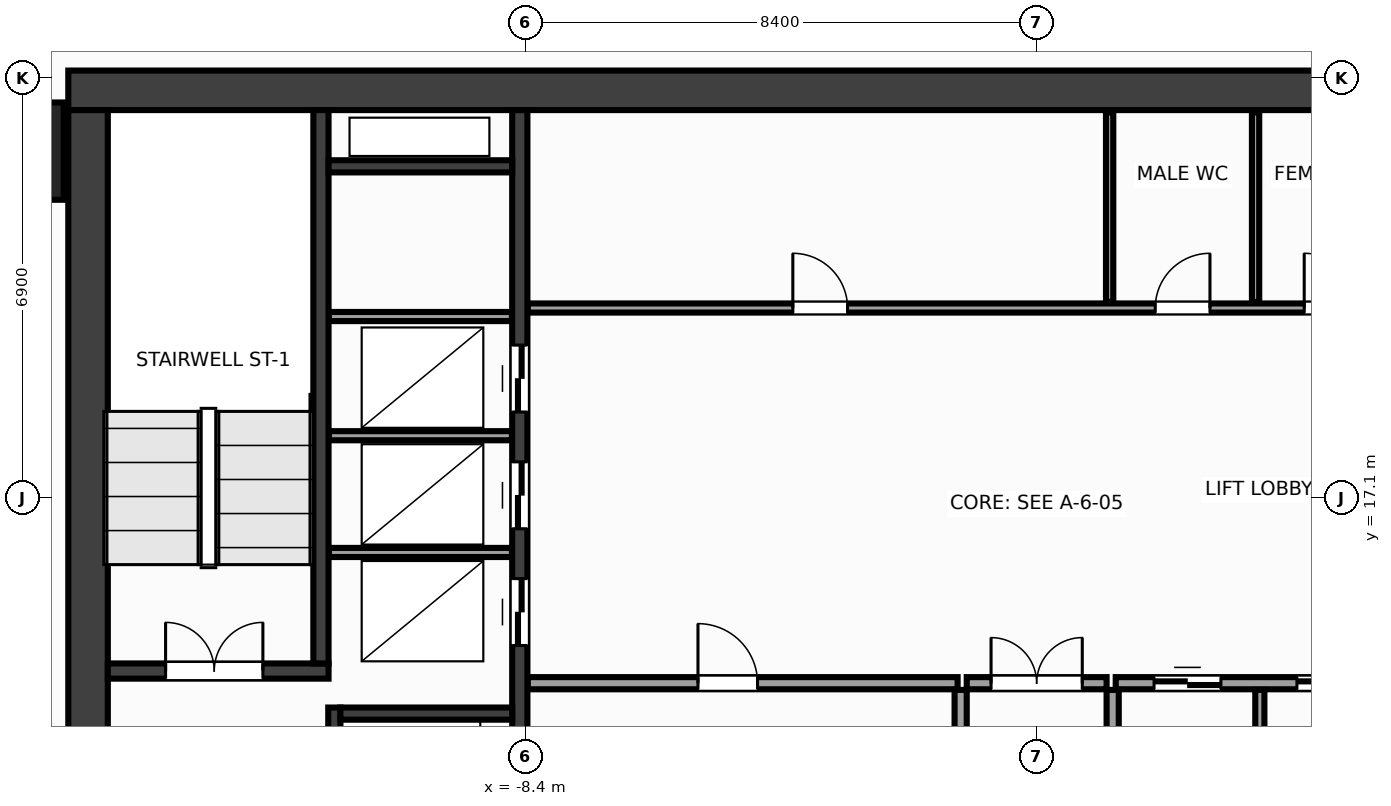
"""IFC4 building model, lengths in metres.
Left out: names, types, materials, properties, quantities, classifications, styles, units other than length and angle.
Written with IfcOpenShell. Run it as: python <this file> out.ifc"""

import sys

from ifc_helpers import new_model, si_unit, direction, frame, frame_2d, origin, origin_2d, place, context, subcontext, project, spatial, rectangle, extrude, source, transform, mapped, element, fill, save


model = new_model("IFC4")
c1 = context("Model", 3, precision=1e-05, world=origin(), true_north=direction((0.0, 1.0)))
c2 = subcontext(c1, "Body", "Model", "MODEL_VIEW")
j1 = project(units=[si_unit("LENGTHUNIT", "METRE"), si_unit("PLANEANGLEUNIT", "RADIAN")], contexts=[c1])
p1 = place(None, origin())
s1 = spatial("IfcSite", under=j1, at=p1, CompositionType="ELEMENT")
p2 = place(p1, origin())
s2 = spatial("IfcBuilding", under=s1, at=p2, CompositionType="ELEMENT")
p3 = place(p2, frame((0.0, 0.0, 131.6)))
s3 = spatial("IfcBuildingStorey", under=s2, at=p3, CompositionType="ELEMENT", Elevation=131.6)
m1 = source(origin(), c2, "Body", "SweptSolid", [
    extrude(rectangle(XDim=31.85, YDim=0.65, at=frame_2d((15.925, 0.0))), origin(), (0.0, 0.0, 1.0), 3.6),
])
p4 = place(p3, frame((-15.925, 23.8, 0.0), z_axis=(0.0, 0.0, 1.0), x_axis=(1.0, 0.0, 0.0)))
e1 = element("IfcWall", 1, at=p4, inside=s3, PredefinedType="SHEAR", context=c2, shape_type="MappedRepresentation", body=[
    mapped(m1, transform((0.0, 0.0, 0.0), x_axis=(1.0, 0.0, 0.0), y_axis=(0.0, 1.0, 0.0), z_axis=(0.0, 0.0, 1.0), scale=1.0)),
])
m2 = source(origin(), c2, "Body", "SweptSolid", [
    extrude(rectangle(XDim=12.95, YDim=0.65, at=frame_2d((6.475, 0.0))), origin(), (0.0, 0.0, 1.0), 3.6),
])
p5 = place(p3, frame((-15.6, 10.525, 0.0), z_axis=(0.0, 0.0, 1.0), x_axis=(0.0, 1.0, 0.0)))
e2 = element("IfcWall", 2, at=p5, inside=s3, PredefinedType="SHEAR", context=c2, shape_type="MappedRepresentation", body=[
    mapped(m2, transform((0.0, 0.0, 0.0), x_axis=(1.0, 0.0, 0.0), y_axis=(0.0, 1.0, 0.0), z_axis=(0.0, 0.0, 1.0), scale=1.0)),
])
m3 = source(origin(), c2, "Body", "SweptSolid", [
    extrude(rectangle(XDim=12.95, YDim=0.25, at=frame_2d((6.475, 0.0))), origin(), (0.0, 0.0, 1.0), 3.6),
])
p6 = place(p3, frame((-8.5, 10.525, 0.0), z_axis=(0.0, 0.0, 1.0), x_axis=(0.0, 1.0, 0.0)))
e3 = element("IfcWall", 3, at=p6, inside=s3, PredefinedType="SHEAR", context=c2, shape_type="MappedRepresentation", body=[
    mapped(m3, transform((0.0, 0.0, 0.0), x_axis=(1.0, 0.0, 0.0), y_axis=(0.0, 1.0, 0.0), z_axis=(0.0, 0.0, 1.0), scale=1.0)),
])
p7 = place(p6, frame((4.145, 0.0, 0.0)))
e4 = element("IfcOpeningElement", 4, at=p7, cuts=e3, PredefinedType="OPENING", context=c2, shape_type="SweptSolid", body=[
    extrude(rectangle(XDim=1.1, YDim=2.15, at=frame_2d((0.55, 1.075))), frame((0.0, 0.137, 0.0), z_axis=(0.0, -1.0, 0.0), x_axis=(1.0, 0.0, 0.0)), (0.0, 0.0, 1.0), 0.274),
])
p8 = place(p6, frame((6.065, 0.0, 0.0)))
e5 = element("IfcOpeningElement", 5, at=p8, cuts=e3, PredefinedType="OPENING", context=c2, shape_type="SweptSolid", body=[
    extrude(rectangle(XDim=1.1, YDim=2.15, at=frame_2d((0.55, 1.075))), frame((0.0, 0.137, 0.0), z_axis=(0.0, -1.0, 0.0), x_axis=(1.0, 0.0, 0.0)), (0.0, 0.0, 1.0), 0.274),
])
p9 = place(p6, frame((7.985, 0.0, 0.0)))
e6 = element("IfcOpeningElement", 6, at=p9, cuts=e3, PredefinedType="OPENING", context=c2, shape_type="SweptSolid", body=[
    extrude(rectangle(XDim=1.1, YDim=2.15, at=frame_2d((0.55, 1.075))), frame((0.0, 0.137, 0.0), z_axis=(0.0, -1.0, 0.0), x_axis=(1.0, 0.0, 0.0)), (0.0, 0.0, 1.0), 0.274),
])
m4 = source(origin(), c2, "Body", "SweptSolid", [
    extrude(rectangle(XDim=3.63, YDim=0.25, at=frame_2d((1.815, 0.0))), origin(), (0.0, 0.0, 1.0), 3.6),
])
p10 = place(p3, frame((-15.275, 14.25, 0.0), z_axis=(0.0, 0.0, 1.0), x_axis=(1.0, 0.0, 0.0)))
e7 = element("IfcWall", 7, at=p10, inside=s3, PredefinedType="SHEAR", context=c2, shape_type="MappedRepresentation", body=[
    mapped(m4, transform((0.0, 0.0, 0.0), x_axis=(1.0, 0.0, 0.0), y_axis=(0.0, 1.0, 0.0), z_axis=(0.0, 0.0, 1.0), scale=1.0)),
])
p11 = place(p10, frame((0.95, 0.0, 0.0)))
e8 = element("IfcOpeningElement", 8, at=p11, cuts=e7, PredefinedType="OPENING", context=c2, shape_type="SweptSolid", body=[
    extrude(rectangle(XDim=1.6, YDim=2.15, at=frame_2d((0.8, 1.075))), frame((0.0, 0.137, 0.0), z_axis=(0.0, -1.0, 0.0), x_axis=(1.0, 0.0, 0.0)), (0.0, 0.0, 1.0), 0.274),
])
m5 = source(origin(), c2, "Body", "SweptSolid", [
    extrude(rectangle(XDim=9.1, YDim=0.25, at=frame_2d((4.55, 0.0))), origin(), (0.0, 0.0, 1.0), 3.6),
])
p12 = place(p3, frame((-11.77, 14.375, 0.0), z_axis=(0.0, 0.0, 1.0), x_axis=(0.0, 1.0, 0.0)))
e9 = element("IfcWall", 9, at=p12, inside=s3, PredefinedType="SHEAR", context=c2, shape_type="MappedRepresentation", body=[
    mapped(m5, transform((0.0, 0.0, 0.0), x_axis=(1.0, 0.0, 0.0), y_axis=(0.0, 1.0, 0.0), z_axis=(0.0, 0.0, 1.0), scale=1.0)),
])
m6 = source(origin(), c2, "Body", "SweptSolid", [
    extrude(rectangle(XDim=3.125, YDim=0.2, at=frame_2d((1.562, 0.0))), origin(), (0.0, 0.0, 1.0), 3.6),
])
p13 = place(p3, frame((-11.55, 10.525, 0.0), z_axis=(0.0, 0.0, 1.0), x_axis=(0.0, 1.0, 0.0)))
e10 = element("IfcWall", 10, at=p13, inside=s3, PredefinedType="SHEAR", context=c2, shape_type="MappedRepresentation", body=[
    mapped(m6, transform((0.0, 0.0, 0.0), x_axis=(1.0, 0.0, 0.0), y_axis=(0.0, 1.0, 0.0), z_axis=(0.0, 0.0, 1.0), scale=1.0)),
])
p14 = place(p13, frame((0.9, 0.0, 0.0)))
e11 = element("IfcOpeningElement", 11, at=p14, cuts=e10, PredefinedType="OPENING", context=c2, shape_type="SweptSolid", body=[
    extrude(rectangle(XDim=1.1, YDim=2.15, at=frame_2d((0.55, 1.075))), frame((0.0, 0.112, 0.0), z_axis=(0.0, -1.0, 0.0), x_axis=(1.0, 0.0, 0.0)), (0.0, 0.0, 1.0), 0.224),
])
m7 = source(origin(), c2, "Body", "SweptSolid", [
    extrude(rectangle(XDim=2.825, YDim=0.2, at=frame_2d((1.413, 0.0))), origin(), (0.0, 0.0, 1.0), 3.6),
])
p15 = place(p3, frame((-11.45, 13.55, 0.0), z_axis=(0.0, 0.0, 1.0), x_axis=(1.0, 0.0, 0.0)))
e12 = element("IfcWall", 12, at=p15, inside=s3, PredefinedType="SHEAR", context=c2, shape_type="MappedRepresentation", body=[
    mapped(m7, transform((0.0, 0.0, 0.0), x_axis=(1.0, 0.0, 0.0), y_axis=(0.0, 1.0, 0.0), z_axis=(0.0, 0.0, 1.0), scale=1.0)),
])
m8 = source(origin(), c2, "Body", "SweptSolid", [
    extrude(rectangle(XDim=3.02, YDim=0.2, at=frame_2d((1.51, 0.0))), origin(), (0.0, 0.0, 1.0), 3.6),
])
p16 = place(p3, frame((-11.645, 22.55, 0.0), z_axis=(0.0, 0.0, 1.0), x_axis=(1.0, 0.0, 0.0)))
e13 = element("IfcWall", 13, at=p16, inside=s3, PredefinedType="SHEAR", context=c2, shape_type="MappedRepresentation", body=[
    mapped(m8, transform((0.0, 0.0, 0.0), x_axis=(1.0, 0.0, 0.0), y_axis=(0.0, 1.0, 0.0), z_axis=(0.0, 0.0, 1.0), scale=1.0)),
])
m9 = source(origin(), c2, "Body", "SweptSolid", [
    extrude(rectangle(XDim=1.6, YDim=1.6, at=origin_2d()), origin(), (0.0, 0.0, 1.0), 3.6),
])
p17 = place(p3, frame((-16.8, 22.8, 0.0), z_axis=(0.0, 0.0, 1.0), x_axis=(1.0, 0.0, 0.0)))
e14 = element("IfcColumn", 14, at=p17, inside=s3, PredefinedType="COLUMN", context=c2, shape_type="MappedRepresentation", body=[
    mapped(m9, transform((0.0, 0.0, 0.0), x_axis=(1.0, 0.0, 0.0), y_axis=(0.0, 1.0, 0.0), z_axis=(0.0, 0.0, 1.0), scale=1.0)),
])
m10 = source(origin(), c2, "Body", "SweptSolid", [
    extrude(rectangle(XDim=3.01, YDim=0.15, at=frame_2d((1.505, 0.0))), origin(), (0.0, 0.0, 1.0), 3.38),
])
for number, where, z_axis, x_axis in (
    (15, (-11.64, 16.2, 0.0), (0.0, 0.0, 1.0), (1.0, 0.0, 0.0)),
    (16, (-11.64, 18.12, 0.0), (0.0, 0.0, 1.0), (1.0, 0.0, 0.0)),
    (17, (-11.64, 20.08, 0.0), (0.0, 0.0, 1.0), (1.0, 0.0, 0.0)),
):
    element("IfcWall", number, at=place(p3, frame(where, z_axis=z_axis, x_axis=x_axis)), inside=s3, PredefinedType="PARTITIONING", context=c2, shape_type="MappedRepresentation", body=[
        mapped(m10, transform((0.0, 0.0, 0.0), x_axis=(1.0, 0.0, 0.0), y_axis=(0.0, 1.0, 0.0), z_axis=(0.0, 0.0, 1.0), scale=1.0)),
    ])
m11 = source(origin(), c2, "Body", "SweptSolid", [
    extrude(rectangle(XDim=7.07, YDim=0.2, at=frame_2d((3.535, 0.0))), origin(), (0.0, 0.0, 1.0), 3.38),
])
p18 = place(p3, frame((-8.37, 14.05, 0.0), z_axis=(0.0, 0.0, 1.0), x_axis=(1.0, 0.0, 0.0)))
e18 = element("IfcWall", 18, at=p18, inside=s3, PredefinedType="PARTITIONING", context=c2, shape_type="MappedRepresentation", body=[
    mapped(m11, transform((0.0, 0.0, 0.0), x_axis=(1.0, 0.0, 0.0), y_axis=(0.0, 1.0, 0.0), z_axis=(0.0, 0.0, 1.0), scale=1.0)),
])
p19 = place(p18, frame((2.8, 0.0, 0.0)))
e19 = element("IfcOpeningElement", 19, at=p19, cuts=e18, PredefinedType="OPENING", context=c2, shape_type="SweptSolid", body=[
    extrude(rectangle(XDim=0.98, YDim=2.15, at=frame_2d((0.49, 1.075))), frame((0.0, 0.112, 0.0), z_axis=(0.0, -1.0, 0.0), x_axis=(1.0, 0.0, 0.0)), (0.0, 0.0, 1.0), 0.224),
])
p20 = place(p3, frame((1.3, 14.05, 0.0), z_axis=(0.0, 0.0, 1.0), x_axis=(1.0, 0.0, 0.0)))
e20 = element("IfcWall", 20, at=p20, inside=s3, PredefinedType="PARTITIONING", context=c2, shape_type="MappedRepresentation", body=[
    mapped(m11, transform((0.0, 0.0, 0.0), x_axis=(1.0, 0.0, 0.0), y_axis=(0.0, 1.0, 0.0), z_axis=(0.0, 0.0, 1.0), scale=1.0)),
])
p21 = place(p20, frame((0.63, 0.0, 0.0)))
e21 = element("IfcOpeningElement", 21, at=p21, cuts=e20, PredefinedType="OPENING", context=c2, shape_type="SweptSolid", body=[
    extrude(rectangle(XDim=1.1, YDim=2.15, at=frame_2d((0.55, 1.075))), frame((0.0, 0.112, 0.0), z_axis=(0.0, -1.0, 0.0), x_axis=(1.0, 0.0, 0.0)), (0.0, 0.0, 1.0), 0.224),
])
p22 = place(p20, frame((2.98, 0.0, 0.0)))
e22 = element("IfcOpeningElement", 22, at=p22, cuts=e20, PredefinedType="OPENING", context=c2, shape_type="SweptSolid", body=[
    extrude(rectangle(XDim=1.1, YDim=2.15, at=frame_2d((0.55, 1.075))), frame((0.0, 0.112, 0.0), z_axis=(0.0, -1.0, 0.0), x_axis=(1.0, 0.0, 0.0)), (0.0, 0.0, 1.0), 0.224),
])
p23 = place(p20, frame((5.33, 0.0, 0.0)))
e23 = element("IfcOpeningElement", 23, at=p23, cuts=e20, PredefinedType="OPENING", context=c2, shape_type="SweptSolid", body=[
    extrude(rectangle(XDim=1.1, YDim=2.15, at=frame_2d((0.55, 1.075))), frame((0.0, 0.112, 0.0), z_axis=(0.0, -1.0, 0.0), x_axis=(1.0, 0.0, 0.0)), (0.0, 0.0, 1.0), 0.224),
])
m12 = source(origin(), c2, "Body", "SweptSolid", [
    extrude(rectangle(XDim=3.415, YDim=0.2, at=frame_2d((1.708, 0.0))), origin(), (0.0, 0.0, 1.0), 3.38),
])
for number, where, z_axis, x_axis in (
    (24, (-1.25, 10.525, 0.0), (0.0, 0.0, 1.0), (0.0, 1.0, 0.0)),
    (25, (1.25, 10.525, 0.0), (0.0, 0.0, 1.0), (0.0, 1.0, 0.0)),
):
    element("IfcWall", number, at=place(p3, frame(where, z_axis=z_axis, x_axis=x_axis)), inside=s3, PredefinedType="PARTITIONING", context=c2, shape_type="MappedRepresentation", body=[
        mapped(m12, transform((0.0, 0.0, 0.0), x_axis=(1.0, 0.0, 0.0), y_axis=(0.0, 1.0, 0.0), z_axis=(0.0, 0.0, 1.0), scale=1.0)),
    ])
m13 = source(origin(), c2, "Body", "SweptSolid", [
    extrude(rectangle(XDim=2.3, YDim=0.2, at=frame_2d((1.15, 0.0))), origin(), (0.0, 0.0, 1.0), 3.38),
])
p24 = place(p3, frame((-1.15, 14.05, 0.0), z_axis=(0.0, 0.0, 1.0), x_axis=(1.0, 0.0, 0.0)))
e26 = element("IfcWall", 26, at=p24, inside=s3, PredefinedType="PARTITIONING", context=c2, shape_type="MappedRepresentation", body=[
    mapped(m13, transform((0.0, 0.0, 0.0), x_axis=(1.0, 0.0, 0.0), y_axis=(0.0, 1.0, 0.0), z_axis=(0.0, 0.0, 1.0), scale=1.0)),
])
p25 = place(p24, frame((0.4, 0.0, 0.0)))
e27 = element("IfcOpeningElement", 27, at=p25, cuts=e26, PredefinedType="OPENING", context=c2, shape_type="SweptSolid", body=[
    extrude(rectangle(XDim=1.5, YDim=2.2, at=frame_2d((0.75, 1.1))), frame((0.0, 0.112, 0.0), z_axis=(0.0, -1.0, 0.0), x_axis=(1.0, 0.0, 0.0)), (0.0, 0.0, 1.0), 0.224),
])
m14 = source(origin(), c2, "Body", "SweptSolid", [
    extrude(rectangle(XDim=14.59, YDim=0.15, at=frame_2d((7.295, 0.0))), origin(), (0.0, 0.0, 1.0), 3.38),
])
p26 = place(p3, frame((-8.37, 20.22, 0.0), z_axis=(0.0, 0.0, 1.0), x_axis=(1.0, 0.0, 0.0)))
e28 = element("IfcWall", 28, at=p26, inside=s3, PredefinedType="PARTITIONING", context=c2, shape_type="MappedRepresentation", body=[
    mapped(m14, transform((0.0, 0.0, 0.0), x_axis=(1.0, 0.0, 0.0), y_axis=(0.0, 1.0, 0.0), z_axis=(0.0, 0.0, 1.0), scale=1.0)),
])
p27 = place(p26, frame((4.36, 0.0, 0.0)))
e29 = element("IfcOpeningElement", 29, at=p27, cuts=e28, PredefinedType="OPENING", context=c2, shape_type="SweptSolid", body=[
    extrude(rectangle(XDim=0.9, YDim=2.15, at=frame_2d((0.45, 1.075))), frame((0.0, 0.087, 0.0), z_axis=(0.0, -1.0, 0.0), x_axis=(1.0, 0.0, 0.0)), (0.0, 0.0, 1.0), 0.174),
])
p28 = place(p26, frame((10.32, 0.0, 0.0)))
e30 = element("IfcOpeningElement", 30, at=p28, cuts=e28, PredefinedType="OPENING", context=c2, shape_type="SweptSolid", body=[
    extrude(rectangle(XDim=0.9, YDim=2.15, at=frame_2d((0.45, 1.075))), frame((0.0, 0.087, 0.0), z_axis=(0.0, -1.0, 0.0), x_axis=(1.0, 0.0, 0.0)), (0.0, 0.0, 1.0), 0.174),
])
p29 = place(p26, frame((12.77, 0.0, 0.0)))
e31 = element("IfcOpeningElement", 31, at=p29, cuts=e28, PredefinedType="OPENING", context=c2, shape_type="SweptSolid", body=[
    extrude(rectangle(XDim=0.9, YDim=2.15, at=frame_2d((0.45, 1.075))), frame((0.0, 0.087, 0.0), z_axis=(0.0, -1.0, 0.0), x_axis=(1.0, 0.0, 0.0)), (0.0, 0.0, 1.0), 0.174),
])
m15 = source(origin(), c2, "Body", "SweptSolid", [
    extrude(rectangle(XDim=3.415, YDim=0.15, at=frame_2d((1.708, 0.0))), origin(), (0.0, 0.0, 1.0), 3.38),
])
p30 = place(p3, frame((3.67, 10.525, 0.0), z_axis=(0.0, 0.0, 1.0), x_axis=(0.0, 1.0, 0.0)))
e32 = element("IfcWall", 32, at=p30, inside=s3, PredefinedType="PARTITIONING", context=c2, shape_type="MappedRepresentation", body=[
    mapped(m15, transform((0.0, 0.0, 0.0), x_axis=(1.0, 0.0, 0.0), y_axis=(0.0, 1.0, 0.0), z_axis=(0.0, 0.0, 1.0), scale=1.0)),
])
m16 = source(origin(), c2, "Body", "SweptSolid", [
    extrude(rectangle(XDim=3.115, YDim=0.12, at=frame_2d((1.558, 0.0))), origin(), (0.0, 0.0, 1.0), 3.38),
])
for number, where, z_axis, x_axis in (
    (33, (1.2, 20.32, 0.0), (0.0, 0.0, 1.0), (0.0, 1.0, 0.0)),
    (34, (3.6, 20.32, 0.0), (0.0, 0.0, 1.0), (0.0, 1.0, 0.0)),
):
    element("IfcWall", number, at=place(p3, frame(where, z_axis=z_axis, x_axis=x_axis)), inside=s3, PredefinedType="PARTITIONING", context=c2, shape_type="MappedRepresentation", body=[
        mapped(m16, transform((0.0, 0.0, 0.0), x_axis=(1.0, 0.0, 0.0), y_axis=(0.0, 1.0, 0.0), z_axis=(0.0, 0.0, 1.0), scale=1.0)),
    ])
m17 = source(origin(), c2, "Body", "SweptSolid", [
    extrude(rectangle(XDim=1.6, YDim=2.15, at=frame_2d((0.8, 1.075))), frame((0.0, 0.025, 0.0), z_axis=(0.0, -1.0, 0.0), x_axis=(1.0, 0.0, 0.0)), (0.0, 0.0, 1.0), 0.05),
])
p31 = place(p11, origin())
e35 = element("IfcDoor", 35, at=p31, inside=s3, OperationType="DOUBLE_DOOR_SINGLE_SWING", PredefinedType="DOOR", context=c2, shape_type="MappedRepresentation", body=[
    mapped(m17, transform((0.0, 0.0, 0.0), x_axis=(1.0, 0.0, 0.0), y_axis=(0.0, 1.0, 0.0), z_axis=(0.0, 0.0, 1.0), scale=1.0)),
])
fill(e8, e35)
m18 = source(origin(), c2, "Body", "SweptSolid", [
    extrude(rectangle(XDim=1.1, YDim=2.15, at=frame_2d((0.55, 1.075))), frame((0.0, 0.025, 0.0), z_axis=(0.0, -1.0, 0.0), x_axis=(1.0, 0.0, 0.0)), (0.0, 0.0, 1.0), 0.05),
])
p32 = place(p7, origin())
e36 = element("IfcDoor", 36, at=p32, inside=s3, OperationType="DOUBLE_DOOR_SLIDING", PredefinedType="DOOR", context=c2, shape_type="MappedRepresentation", body=[
    mapped(m18, transform((0.0, 0.0, 0.0), x_axis=(1.0, 0.0, 0.0), y_axis=(0.0, 1.0, 0.0), z_axis=(0.0, 0.0, 1.0), scale=1.0)),
])
fill(e4, e36)
p33 = place(p8, origin())
e37 = element("IfcDoor", 37, at=p33, inside=s3, OperationType="DOUBLE_DOOR_SLIDING", PredefinedType="DOOR", context=c2, shape_type="MappedRepresentation", body=[
    mapped(m18, transform((0.0, 0.0, 0.0), x_axis=(1.0, 0.0, 0.0), y_axis=(0.0, 1.0, 0.0), z_axis=(0.0, 0.0, 1.0), scale=1.0)),
])
fill(e5, e37)
p34 = place(p9, origin())
e38 = element("IfcDoor", 38, at=p34, inside=s3, OperationType="DOUBLE_DOOR_SLIDING", PredefinedType="DOOR", context=c2, shape_type="MappedRepresentation", body=[
    mapped(m18, transform((0.0, 0.0, 0.0), x_axis=(1.0, 0.0, 0.0), y_axis=(0.0, 1.0, 0.0), z_axis=(0.0, 0.0, 1.0), scale=1.0)),
])
fill(e6, e38)
m19 = source(origin(), c2, "Body", "SweptSolid", [
    extrude(rectangle(XDim=0.98, YDim=2.15, at=frame_2d((0.49, 1.075))), frame((0.0, 0.025, 0.0), z_axis=(0.0, -1.0, 0.0), x_axis=(1.0, 0.0, 0.0)), (0.0, 0.0, 1.0), 0.05),
])
p35 = place(p19, origin())
e39 = element("IfcDoor", 39, at=p35, inside=s3, OperationType="SINGLE_SWING_LEFT", PredefinedType="DOOR", context=c2, shape_type="MappedRepresentation", body=[
    mapped(m19, transform((0.0, 0.0, 0.0), x_axis=(1.0, 0.0, 0.0), y_axis=(0.0, 1.0, 0.0), z_axis=(0.0, 0.0, 1.0), scale=1.0)),
])
fill(e19, e39)
p36 = place(p21, origin())
e40 = element("IfcDoor", 40, at=p36, inside=s3, OperationType="DOUBLE_DOOR_SLIDING", PredefinedType="DOOR", context=c2, shape_type="MappedRepresentation", body=[
    mapped(m18, transform((0.0, 0.0, 0.0), x_axis=(1.0, 0.0, 0.0), y_axis=(0.0, 1.0, 0.0), z_axis=(0.0, 0.0, 1.0), scale=1.0)),
])
fill(e21, e40)
p37 = place(p22, origin())
e41 = element("IfcDoor", 41, at=p37, inside=s3, OperationType="DOUBLE_DOOR_SLIDING", PredefinedType="DOOR", context=c2, shape_type="MappedRepresentation", body=[
    mapped(m18, transform((0.0, 0.0, 0.0), x_axis=(1.0, 0.0, 0.0), y_axis=(0.0, 1.0, 0.0), z_axis=(0.0, 0.0, 1.0), scale=1.0)),
])
fill(e22, e41)
m20 = source(origin(), c2, "Body", "SweptSolid", [
    extrude(rectangle(XDim=1.5, YDim=2.2, at=frame_2d((0.75, 1.1))), frame((0.0, 0.025, 0.0), z_axis=(0.0, -1.0, 0.0), x_axis=(1.0, 0.0, 0.0)), (0.0, 0.0, 1.0), 0.05),
])
p38 = place(p25, origin())
e42 = element("IfcDoor", 42, at=p38, inside=s3, OperationType="DOUBLE_DOOR_SINGLE_SWING", PredefinedType="DOOR", context=c2, shape_type="MappedRepresentation", body=[
    mapped(m20, transform((0.0, 0.0, 0.0), x_axis=(1.0, 0.0, 0.0), y_axis=(0.0, 1.0, 0.0), z_axis=(0.0, 0.0, 1.0), scale=1.0)),
])
fill(e27, e42)
m21 = source(origin(), c2, "Body", "SweptSolid", [
    extrude(rectangle(XDim=0.9, YDim=2.15, at=frame_2d((0.45, 1.075))), frame((0.0, 0.025, 0.0), z_axis=(0.0, -1.0, 0.0), x_axis=(1.0, 0.0, 0.0)), (0.0, 0.0, 1.0), 0.05),
])
p39 = place(p27, origin())
e43 = element("IfcDoor", 43, at=p39, inside=s3, OperationType="SINGLE_SWING_LEFT", PredefinedType="DOOR", context=c2, shape_type="MappedRepresentation", body=[
    mapped(m21, transform((0.0, 0.0, 0.0), x_axis=(1.0, 0.0, 0.0), y_axis=(0.0, 1.0, 0.0), z_axis=(0.0, 0.0, 1.0), scale=1.0)),
])
fill(e29, e43)
p40 = place(p28, origin())
e44 = element("IfcDoor", 44, at=p40, inside=s3, OperationType="SINGLE_SWING_RIGHT", PredefinedType="DOOR", context=c2, shape_type="MappedRepresentation", body=[
    mapped(m21, transform((0.0, 0.0, 0.0), x_axis=(1.0, 0.0, 0.0), y_axis=(0.0, 1.0, 0.0), z_axis=(0.0, 0.0, 1.0), scale=1.0)),
])
fill(e30, e44)
p41 = place(p29, origin())
e45 = element("IfcDoor", 45, at=p41, inside=s3, OperationType="SINGLE_SWING_LEFT", PredefinedType="DOOR", context=c2, shape_type="MappedRepresentation", body=[
    mapped(m21, transform((0.0, 0.0, 0.0), x_axis=(1.0, 0.0, 0.0), y_axis=(0.0, 1.0, 0.0), z_axis=(0.0, 0.0, 1.0), scale=1.0)),
])
fill(e31, e45)
save(model, sys.argv[1])
